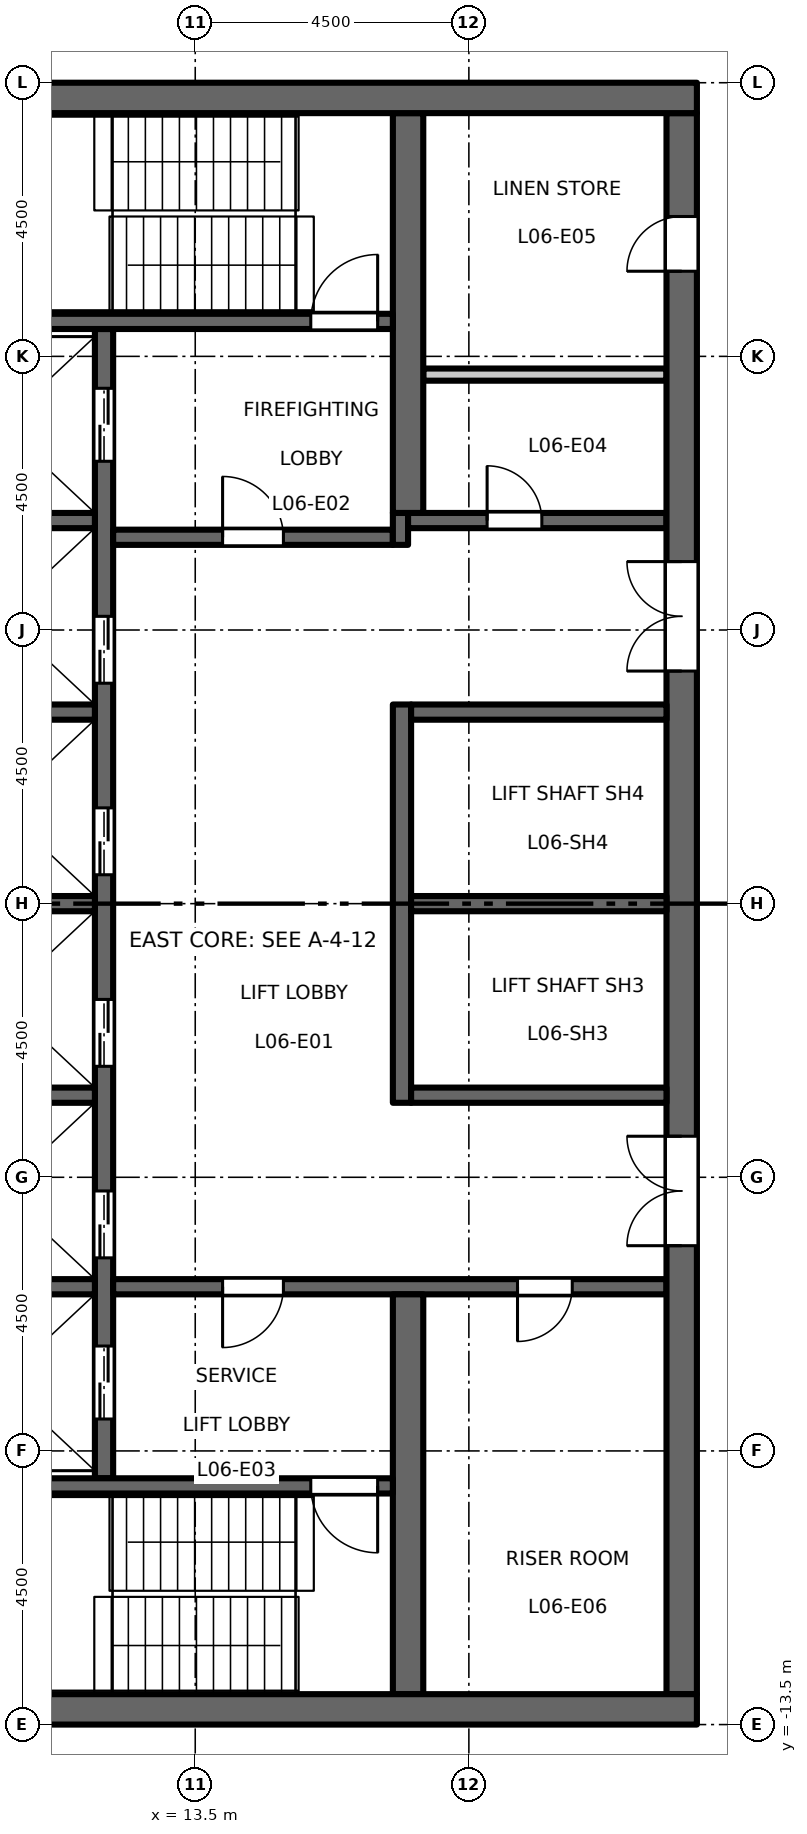
"""IFC4 building model, lengths in metres.
Left out: names, types, materials, properties, quantities, classifications, styles, units other than length and angle.
Written with IfcOpenShell. Run it as: python <this file> out.ifc"""

import sys

from ifc_helpers import new_model, si_unit, direction, frame, frame_2d, origin, place, context, subcontext, project, spatial, rectangle, extrude, element, fill, save


model = new_model("IFC4")
c1 = context("Model", 3, precision=1e-05, world=origin(), true_north=direction((0.0, 1.0)))
c2 = subcontext(c1, "Body", "Model", "MODEL_VIEW")
j1 = project(units=[si_unit("LENGTHUNIT", "METRE"), si_unit("PLANEANGLEUNIT", "RADIAN")], contexts=[c1])
p1 = place(None, origin())
s1 = spatial("IfcSite", under=j1, at=p1, CompositionType="ELEMENT")
p2 = place(p1, origin())
s2 = spatial("IfcBuilding", under=s1, at=p2, CompositionType="ELEMENT")
p3 = place(p2, frame((0.0, 0.0, 31.2)))
s3 = spatial("IfcBuildingStorey", under=s2, at=p3, CompositionType="ELEMENT", Elevation=31.2)
p4 = place(p3, frame((12.0, -9.45, 0.0), z_axis=(0.0, 0.0, 1.0), x_axis=(0.0, 1.0, 0.0)))
e1 = element("IfcWall", 1, at=p4, inside=s3, PredefinedType="SHEAR", context=c2, shape_type="SweptSolid", body=[
    extrude(rectangle(XDim=18.9, YDim=0.3, at=frame_2d((9.45, 0.0))), origin(), (0.0, 0.0, 1.0), 4.35),
])
p5 = place(p4, frame((3.625, 0.0, 0.0)))
e2 = element("IfcOpeningElement", 2, at=p5, cuts=e1, PredefinedType="OPENING", context=c2, shape_type="SweptSolid", body=[
    extrude(rectangle(XDim=1.1, YDim=2.1, at=frame_2d((0.55, 1.05))), frame((0.0, 0.16, 0.0), z_axis=(0.0, -1.0, 0.0), x_axis=(1.0, 0.0, 0.0)), (0.0, 0.0, 1.0), 0.32),
])
p6 = place(p4, frame((6.775, 0.0, 0.0)))
e3 = element("IfcOpeningElement", 3, at=p6, cuts=e1, PredefinedType="OPENING", context=c2, shape_type="SweptSolid", body=[
    extrude(rectangle(XDim=1.1, YDim=2.1, at=frame_2d((0.55, 1.05))), frame((0.0, 0.16, 0.0), z_axis=(0.0, -1.0, 0.0), x_axis=(1.0, 0.0, 0.0)), (0.0, 0.0, 1.0), 0.32),
])
p7 = place(p4, frame((9.925, 0.0, 0.0)))
e4 = element("IfcOpeningElement", 4, at=p7, cuts=e1, PredefinedType="OPENING", context=c2, shape_type="SweptSolid", body=[
    extrude(rectangle(XDim=1.1, YDim=2.1, at=frame_2d((0.55, 1.05))), frame((0.0, 0.16, 0.0), z_axis=(0.0, -1.0, 0.0), x_axis=(1.0, 0.0, 0.0)), (0.0, 0.0, 1.0), 0.32),
])
p8 = place(p4, frame((13.075, 0.0, 0.0)))
e5 = element("IfcOpeningElement", 5, at=p8, cuts=e1, PredefinedType="OPENING", context=c2, shape_type="SweptSolid", body=[
    extrude(rectangle(XDim=1.1, YDim=2.1, at=frame_2d((0.55, 1.05))), frame((0.0, 0.16, 0.0), z_axis=(0.0, -1.0, 0.0), x_axis=(1.0, 0.0, 0.0)), (0.0, 0.0, 1.0), 0.32),
])
p9 = place(p4, frame((16.725, 0.0, 0.0)))
e6 = element("IfcOpeningElement", 6, at=p9, cuts=e1, PredefinedType="OPENING", context=c2, shape_type="SweptSolid", body=[
    extrude(rectangle(XDim=1.2, YDim=2.1, at=frame_2d((0.6, 1.05))), frame((0.0, 0.16, 0.0), z_axis=(0.0, -1.0, 0.0), x_axis=(1.0, 0.0, 0.0)), (0.0, 0.0, 1.0), 0.32),
])
p10 = place(p4, frame((0.975, 0.0, 0.0)))
e7 = element("IfcOpeningElement", 7, at=p10, cuts=e1, PredefinedType="OPENING", context=c2, shape_type="SweptSolid", body=[
    extrude(rectangle(XDim=1.2, YDim=2.1, at=frame_2d((0.6, 1.05))), frame((0.0, 0.16, 0.0), z_axis=(0.0, -1.0, 0.0), x_axis=(1.0, 0.0, 0.0)), (0.0, 0.0, 1.0), 0.32),
])
p11 = place(p3, frame((12.15, 6.025, 0.0), z_axis=(0.0, 0.0, 1.0), x_axis=(1.0, 0.0, 0.0)))
e8 = element("IfcWall", 8, at=p11, inside=s3, PredefinedType="SHEAR", context=c2, shape_type="SweptSolid", body=[
    extrude(rectangle(XDim=4.6, YDim=0.25, at=frame_2d((2.3, 0.0))), origin(), (0.0, 0.0, 1.0), 4.35),
])
p12 = place(p11, frame((1.8, 0.0, 0.0)))
e9 = element("IfcOpeningElement", 9, at=p12, cuts=e8, PredefinedType="OPENING", context=c2, shape_type="SweptSolid", body=[
    extrude(rectangle(XDim=1.0, YDim=2.1, at=frame_2d((0.5, 1.05))), frame((0.0, 0.135, 0.0), z_axis=(0.0, -1.0, 0.0), x_axis=(1.0, 0.0, 0.0)), (0.0, 0.0, 1.0), 0.27),
])
p13 = place(p3, frame((16.875, 5.9, 0.0), z_axis=(0.0, 0.0, 1.0), x_axis=(0.0, 1.0, 0.0)))
e10 = element("IfcWall", 10, at=p13, inside=s3, PredefinedType="SHEAR", context=c2, shape_type="SweptSolid", body=[
    extrude(rectangle(XDim=0.525, YDim=0.25, at=frame_2d((0.263, 0.0))), origin(), (0.0, 0.0, 1.0), 4.35),
])
p14 = place(p3, frame((17.0, 6.3, 0.0), z_axis=(0.0, 0.0, 1.0), x_axis=(1.0, 0.0, 0.0)))
e11 = element("IfcWall", 11, at=p14, inside=s3, PredefinedType="SHEAR", context=c2, shape_type="SweptSolid", body=[
    extrude(rectangle(XDim=4.25, YDim=0.25, at=frame_2d((2.125, 0.0))), origin(), (0.0, 0.0, 1.0), 4.35),
])
p15 = place(p14, frame((1.3, 0.0, 0.0)))
e12 = element("IfcOpeningElement", 12, at=p15, cuts=e11, PredefinedType="OPENING", context=c2, shape_type="SweptSolid", body=[
    extrude(rectangle(XDim=0.9, YDim=2.1, at=frame_2d((0.45, 1.05))), frame((0.0, 0.135, 0.0), z_axis=(0.0, -1.0, 0.0), x_axis=(1.0, 0.0, 0.0)), (0.0, 0.0, 1.0), 0.27),
])
p16 = place(p3, frame((12.15, -6.3, 0.0), z_axis=(0.0, 0.0, 1.0), x_axis=(1.0, 0.0, 0.0)))
e13 = element("IfcWall", 13, at=p16, inside=s3, PredefinedType="SHEAR", context=c2, shape_type="SweptSolid", body=[
    extrude(rectangle(XDim=9.1, YDim=0.25, at=frame_2d((4.55, 0.0))), origin(), (0.0, 0.0, 1.0), 4.35),
])
p17 = place(p16, frame((1.8, 0.0, 0.0)))
e14 = element("IfcOpeningElement", 14, at=p17, cuts=e13, PredefinedType="OPENING", context=c2, shape_type="SweptSolid", body=[
    extrude(rectangle(XDim=1.0, YDim=2.1, at=frame_2d((0.5, 1.05))), frame((0.0, 0.135, 0.0), z_axis=(0.0, -1.0, 0.0), x_axis=(1.0, 0.0, 0.0)), (0.0, 0.0, 1.0), 0.27),
])
p18 = place(p16, frame((6.65, 0.0, 0.0)))
e15 = element("IfcOpeningElement", 15, at=p18, cuts=e13, PredefinedType="OPENING", context=c2, shape_type="SweptSolid", body=[
    extrude(rectangle(XDim=0.9, YDim=2.1, at=frame_2d((0.45, 1.05))), frame((0.0, 0.135, 0.0), z_axis=(0.0, -1.0, 0.0), x_axis=(1.0, 0.0, 0.0)), (0.0, 0.0, 1.0), 0.27),
])
p19 = place(p3, frame((21.5, -13.0, 0.0), z_axis=(0.0, 0.0, 1.0), x_axis=(0.0, 1.0, 0.0)))
e16 = element("IfcWall", 16, at=p19, inside=s3, PredefinedType="SHEAR", context=c2, shape_type="SweptSolid", body=[
    extrude(rectangle(XDim=26.0, YDim=0.5, at=frame_2d((13.0, 0.0))), origin(), (0.0, 0.0, 1.0), 4.35),
])
p20 = place(p19, frame((16.825, 0.0, 0.0)))
e17 = element("IfcOpeningElement", 17, at=p20, cuts=e16, PredefinedType="OPENING", context=c2, shape_type="SweptSolid", body=[
    extrude(rectangle(XDim=1.8, YDim=2.1, at=frame_2d((0.9, 1.05))), frame((0.0, 0.26, 0.0), z_axis=(0.0, -1.0, 0.0), x_axis=(1.0, 0.0, 0.0)), (0.0, 0.0, 1.0), 0.52),
])
p21 = place(p19, frame((7.375, 0.0, 0.0)))
e18 = element("IfcOpeningElement", 18, at=p21, cuts=e16, PredefinedType="OPENING", context=c2, shape_type="SweptSolid", body=[
    extrude(rectangle(XDim=1.8, YDim=2.1, at=frame_2d((0.9, 1.05))), frame((0.0, 0.26, 0.0), z_axis=(0.0, -1.0, 0.0), x_axis=(1.0, 0.0, 0.0)), (0.0, 0.0, 1.0), 0.52),
])
p22 = place(p19, frame((23.4, 0.0, 0.0)))
e19 = element("IfcOpeningElement", 19, at=p22, cuts=e16, PredefinedType="OPENING", context=c2, shape_type="SweptSolid", body=[
    extrude(rectangle(XDim=0.9, YDim=2.1, at=frame_2d((0.45, 1.05))), frame((0.0, 0.26, 0.0), z_axis=(0.0, -1.0, 0.0), x_axis=(1.0, 0.0, 0.0)), (0.0, 0.0, 1.0), 0.52),
])
p23 = place(p3, frame((17.25, 8.7, 0.0), z_axis=(0.0, 0.0, 1.0), x_axis=(1.0, 0.0, 0.0)))
e20 = element("IfcWall", 20, at=p23, inside=s3, PredefinedType="PARTITIONING", context=c2, shape_type="SweptSolid", body=[
    extrude(rectangle(XDim=4.0, YDim=0.2, at=frame_2d((2.0, 0.0))), origin(), (0.0, 0.0, 1.0), 4.35),
])
p24 = place(p3, frame((16.9, -3.275, 0.0), z_axis=(0.0, 0.0, 1.0), x_axis=(0.0, 1.0, 0.0)))
e21 = element("IfcWall", 21, at=p24, inside=s3, PredefinedType="SHEAR", context=c2, shape_type="SweptSolid", body=[
    extrude(rectangle(XDim=6.55, YDim=0.3, at=frame_2d((3.275, 0.0))), origin(), (0.0, 0.0, 1.0), 4.35),
])
for number, where, z_axis, x_axis in (
    (22, (17.05, 0.0, 0.0), (0.0, 0.0, 1.0), (1.0, 0.0, 0.0)),
    (23, (17.05, 3.15, 0.0), (0.0, 0.0, 1.0), (1.0, 0.0, 0.0)),
    (24, (17.05, -3.15, 0.0), (0.0, 0.0, 1.0), (1.0, 0.0, 0.0)),
):
    element("IfcWall", number, at=place(p3, frame(where, z_axis=z_axis, x_axis=x_axis)), inside=s3, PredefinedType="SHEAR", context=c2, shape_type="SweptSolid", body=[
        extrude(rectangle(XDim=4.2, YDim=0.25, at=frame_2d((2.1, 0.0))), origin(), (0.0, 0.0, 1.0), 4.35),
    ])
for number, where, z_axis, x_axis in (
    (25, (17.0, 6.425, 0.0), (0.0, 0.0, 1.0), (0.0, 1.0, 0.0)),
    (26, (17.0, -13.0, 0.0), (0.0, 0.0, 1.0), (0.0, 1.0, 0.0)),
):
    element("IfcWall", number, at=place(p3, frame(where, z_axis=z_axis, x_axis=x_axis)), inside=s3, PredefinedType="SHEAR", context=c2, shape_type="SweptSolid", body=[
        extrude(rectangle(XDim=6.575, YDim=0.5, at=frame_2d((3.288, 0.0))), origin(), (0.0, 0.0, 1.0), 4.35),
    ])
for number, where, z_axis, x_axis in (
    (27, (8.75, 0.0, 0.0), (0.0, 0.0, 1.0), (1.0, 0.0, 0.0)),
    (28, (8.75, 3.15, 0.0), (0.0, 0.0, 1.0), (1.0, 0.0, 0.0)),
    (29, (8.75, 6.3, 0.0), (0.0, 0.0, 1.0), (1.0, 0.0, 0.0)),
    (30, (8.75, -3.15, 0.0), (0.0, 0.0, 1.0), (1.0, 0.0, 0.0)),
    (31, (8.75, -6.3, 0.0), (0.0, 0.0, 1.0), (1.0, 0.0, 0.0)),
):
    element("IfcWall", number, at=place(p3, frame(where, z_axis=z_axis, x_axis=x_axis)), inside=s3, PredefinedType="SHEAR", context=c2, shape_type="SweptSolid", body=[
        extrude(rectangle(XDim=3.1, YDim=0.25, at=frame_2d((1.55, 0.0))), origin(), (0.0, 0.0, 1.0), 4.35),
    ])
p25 = place(p3, frame((8.75, 9.575, 0.0), z_axis=(0.0, 0.0, 1.0), x_axis=(1.0, 0.0, 0.0)))
e32 = element("IfcWall", 32, at=p25, inside=s3, PredefinedType="SHEAR", context=c2, shape_type="SweptSolid", body=[
    extrude(rectangle(XDim=8.0, YDim=0.25, at=frame_2d((4.0, 0.0))), origin(), (0.0, 0.0, 1.0), 4.35),
])
p26 = place(p25, frame((6.65, 0.0, 0.0)))
e33 = element("IfcOpeningElement", 33, at=p26, cuts=e32, PredefinedType="OPENING", context=c2, shape_type="SweptSolid", body=[
    extrude(rectangle(XDim=1.1, YDim=2.1, at=frame_2d((0.55, 1.05))), frame((0.0, 0.135, 0.0), z_axis=(0.0, -1.0, 0.0), x_axis=(1.0, 0.0, 0.0)), (0.0, 0.0, 1.0), 0.27),
])
p27 = place(p3, frame((8.75, -9.575, 0.0), z_axis=(0.0, 0.0, 1.0), x_axis=(1.0, 0.0, 0.0)))
e34 = element("IfcWall", 34, at=p27, inside=s3, PredefinedType="SHEAR", context=c2, shape_type="SweptSolid", body=[
    extrude(rectangle(XDim=8.0, YDim=0.25, at=frame_2d((4.0, 0.0))), origin(), (0.0, 0.0, 1.0), 4.35),
])
p28 = place(p27, frame((6.65, 0.0, 0.0)))
e35 = element("IfcOpeningElement", 35, at=p28, cuts=e34, PredefinedType="OPENING", context=c2, shape_type="SweptSolid", body=[
    extrude(rectangle(XDim=1.1, YDim=2.1, at=frame_2d((0.55, 1.05))), frame((0.0, 0.135, 0.0), z_axis=(0.0, -1.0, 0.0), x_axis=(1.0, 0.0, 0.0)), (0.0, 0.0, 1.0), 0.27),
])
for number, where, z_axis, x_axis in (
    (36, (8.25, 13.25, 0.0), (0.0, 0.0, 1.0), (1.0, 0.0, 0.0)),
    (37, (8.25, -13.25, 0.0), (0.0, 0.0, 1.0), (1.0, 0.0, 0.0)),
):
    element("IfcWall", number, at=place(p3, frame(where, z_axis=z_axis, x_axis=x_axis)), inside=s3, PredefinedType="SHEAR", context=c2, shape_type="SweptSolid", body=[
        extrude(rectangle(XDim=13.5, YDim=0.5, at=frame_2d((6.75, 0.0))), origin(), (0.0, 0.0, 1.0), 4.35),
    ])
p29 = place(p12, origin())
e38 = element("IfcDoor", 38, at=p29, inside=s3, OperationType="SINGLE_SWING_RIGHT", PredefinedType="DOOR", context=c2, shape_type="SweptSolid", body=[
    extrude(rectangle(XDim=1.0, YDim=2.1, at=frame_2d((0.5, 1.05))), frame((0.0, 0.025, 0.0), z_axis=(0.0, -1.0, 0.0), x_axis=(1.0, 0.0, 0.0)), (0.0, 0.0, 1.0), 0.05),
])
fill(e9, e38)
p30 = place(p17, origin())
e39 = element("IfcDoor", 39, at=p30, inside=s3, OperationType="SINGLE_SWING_LEFT", PredefinedType="DOOR", context=c2, shape_type="SweptSolid", body=[
    extrude(rectangle(XDim=1.0, YDim=2.1, at=frame_2d((0.5, 1.05))), frame((0.0, 0.025, 0.0), z_axis=(0.0, -1.0, 0.0), x_axis=(1.0, 0.0, 0.0)), (0.0, 0.0, 1.0), 0.05),
])
fill(e14, e39)
p31 = place(p26, origin())
e40 = element("IfcDoor", 40, at=p31, inside=s3, OperationType="SINGLE_SWING_LEFT", PredefinedType="DOOR", context=c2, shape_type="SweptSolid", body=[
    extrude(rectangle(XDim=1.1, YDim=2.1, at=frame_2d((0.55, 1.05))), frame((0.0, 0.025, 0.0), z_axis=(0.0, -1.0, 0.0), x_axis=(1.0, 0.0, 0.0)), (0.0, 0.0, 1.0), 0.05),
])
fill(e33, e40)
p32 = place(p28, origin())
e41 = element("IfcDoor", 41, at=p32, inside=s3, OperationType="SINGLE_SWING_RIGHT", PredefinedType="DOOR", context=c2, shape_type="SweptSolid", body=[
    extrude(rectangle(XDim=1.1, YDim=2.1, at=frame_2d((0.55, 1.05))), frame((0.0, 0.025, 0.0), z_axis=(0.0, -1.0, 0.0), x_axis=(1.0, 0.0, 0.0)), (0.0, 0.0, 1.0), 0.05),
])
fill(e35, e41)
p33 = place(p20, origin())
e42 = element("IfcDoor", 42, at=p33, inside=s3, OperationType="DOUBLE_DOOR_DOUBLE_SWING", PredefinedType="DOOR", context=c2, shape_type="SweptSolid", body=[
    extrude(rectangle(XDim=1.8, YDim=2.1, at=frame_2d((0.9, 1.05))), frame((0.0, 0.025, 0.0), z_axis=(0.0, -1.0, 0.0), x_axis=(1.0, 0.0, 0.0)), (0.0, 0.0, 1.0), 0.05),
])
fill(e17, e42)
p34 = place(p21, origin())
e43 = element("IfcDoor", 43, at=p34, inside=s3, OperationType="DOUBLE_DOOR_DOUBLE_SWING", PredefinedType="DOOR", context=c2, shape_type="SweptSolid", body=[
    extrude(rectangle(XDim=1.8, YDim=2.1, at=frame_2d((0.9, 1.05))), frame((0.0, 0.025, 0.0), z_axis=(0.0, -1.0, 0.0), x_axis=(1.0, 0.0, 0.0)), (0.0, 0.0, 1.0), 0.05),
])
fill(e18, e43)
p35 = place(p5, origin())
e44 = element("IfcDoor", 44, at=p35, inside=s3, OperationType="DOUBLE_DOOR_SLIDING", PredefinedType="DOOR", context=c2, shape_type="SweptSolid", body=[
    extrude(rectangle(XDim=1.1, YDim=2.1, at=frame_2d((0.55, 1.05))), frame((0.0, 0.025, 0.0), z_axis=(0.0, -1.0, 0.0), x_axis=(1.0, 0.0, 0.0)), (0.0, 0.0, 1.0), 0.05),
])
fill(e2, e44)
p36 = place(p6, origin())
e45 = element("IfcDoor", 45, at=p36, inside=s3, OperationType="DOUBLE_DOOR_SLIDING", PredefinedType="DOOR", context=c2, shape_type="SweptSolid", body=[
    extrude(rectangle(XDim=1.1, YDim=2.1, at=frame_2d((0.55, 1.05))), frame((0.0, 0.025, 0.0), z_axis=(0.0, -1.0, 0.0), x_axis=(1.0, 0.0, 0.0)), (0.0, 0.0, 1.0), 0.05),
])
fill(e3, e45)
p37 = place(p7, origin())
e46 = element("IfcDoor", 46, at=p37, inside=s3, OperationType="DOUBLE_DOOR_SLIDING", PredefinedType="DOOR", context=c2, shape_type="SweptSolid", body=[
    extrude(rectangle(XDim=1.1, YDim=2.1, at=frame_2d((0.55, 1.05))), frame((0.0, 0.025, 0.0), z_axis=(0.0, -1.0, 0.0), x_axis=(1.0, 0.0, 0.0)), (0.0, 0.0, 1.0), 0.05),
])
fill(e4, e46)
p38 = place(p8, origin())
e47 = element("IfcDoor", 47, at=p38, inside=s3, OperationType="DOUBLE_DOOR_SLIDING", PredefinedType="DOOR", context=c2, shape_type="SweptSolid", body=[
    extrude(rectangle(XDim=1.1, YDim=2.1, at=frame_2d((0.55, 1.05))), frame((0.0, 0.025, 0.0), z_axis=(0.0, -1.0, 0.0), x_axis=(1.0, 0.0, 0.0)), (0.0, 0.0, 1.0), 0.05),
])
fill(e5, e47)
p39 = place(p9, origin())
e48 = element("IfcDoor", 48, at=p39, inside=s3, OperationType="DOUBLE_DOOR_SLIDING", PredefinedType="DOOR", context=c2, shape_type="SweptSolid", body=[
    extrude(rectangle(XDim=1.2, YDim=2.1, at=frame_2d((0.6, 1.05))), frame((0.0, 0.025, 0.0), z_axis=(0.0, -1.0, 0.0), x_axis=(1.0, 0.0, 0.0)), (0.0, 0.0, 1.0), 0.05),
])
fill(e6, e48)
p40 = place(p10, origin())
e49 = element("IfcDoor", 49, at=p40, inside=s3, OperationType="DOUBLE_DOOR_SLIDING", PredefinedType="DOOR", context=c2, shape_type="SweptSolid", body=[
    extrude(rectangle(XDim=1.2, YDim=2.1, at=frame_2d((0.6, 1.05))), frame((0.0, 0.025, 0.0), z_axis=(0.0, -1.0, 0.0), x_axis=(1.0, 0.0, 0.0)), (0.0, 0.0, 1.0), 0.05),
])
fill(e7, e49)
p41 = place(p15, origin())
e50 = element("IfcDoor", 50, at=p41, inside=s3, OperationType="SINGLE_SWING_RIGHT", PredefinedType="DOOR", context=c2, shape_type="SweptSolid", body=[
    extrude(rectangle(XDim=0.9, YDim=2.1, at=frame_2d((0.45, 1.05))), frame((0.0, 0.025, 0.0), z_axis=(0.0, -1.0, 0.0), x_axis=(1.0, 0.0, 0.0)), (0.0, 0.0, 1.0), 0.05),
])
fill(e12, e50)
p42 = place(p22, origin())
e51 = element("IfcDoor", 51, at=p42, inside=s3, OperationType="SINGLE_SWING_RIGHT", PredefinedType="DOOR", context=c2, shape_type="SweptSolid", body=[
    extrude(rectangle(XDim=0.9, YDim=2.1, at=frame_2d((0.45, 1.05))), frame((0.0, 0.025, 0.0), z_axis=(0.0, -1.0, 0.0), x_axis=(1.0, 0.0, 0.0)), (0.0, 0.0, 1.0), 0.05),
])
fill(e19, e51)
p43 = place(p18, origin())
e52 = element("IfcDoor", 52, at=p43, inside=s3, OperationType="SINGLE_SWING_LEFT", PredefinedType="DOOR", context=c2, shape_type="SweptSolid", body=[
    extrude(rectangle(XDim=0.9, YDim=2.1, at=frame_2d((0.45, 1.05))), frame((0.0, 0.025, 0.0), z_axis=(0.0, -1.0, 0.0), x_axis=(1.0, 0.0, 0.0)), (0.0, 0.0, 1.0), 0.05),
])
fill(e15, e52)
save(model, sys.argv[1])
